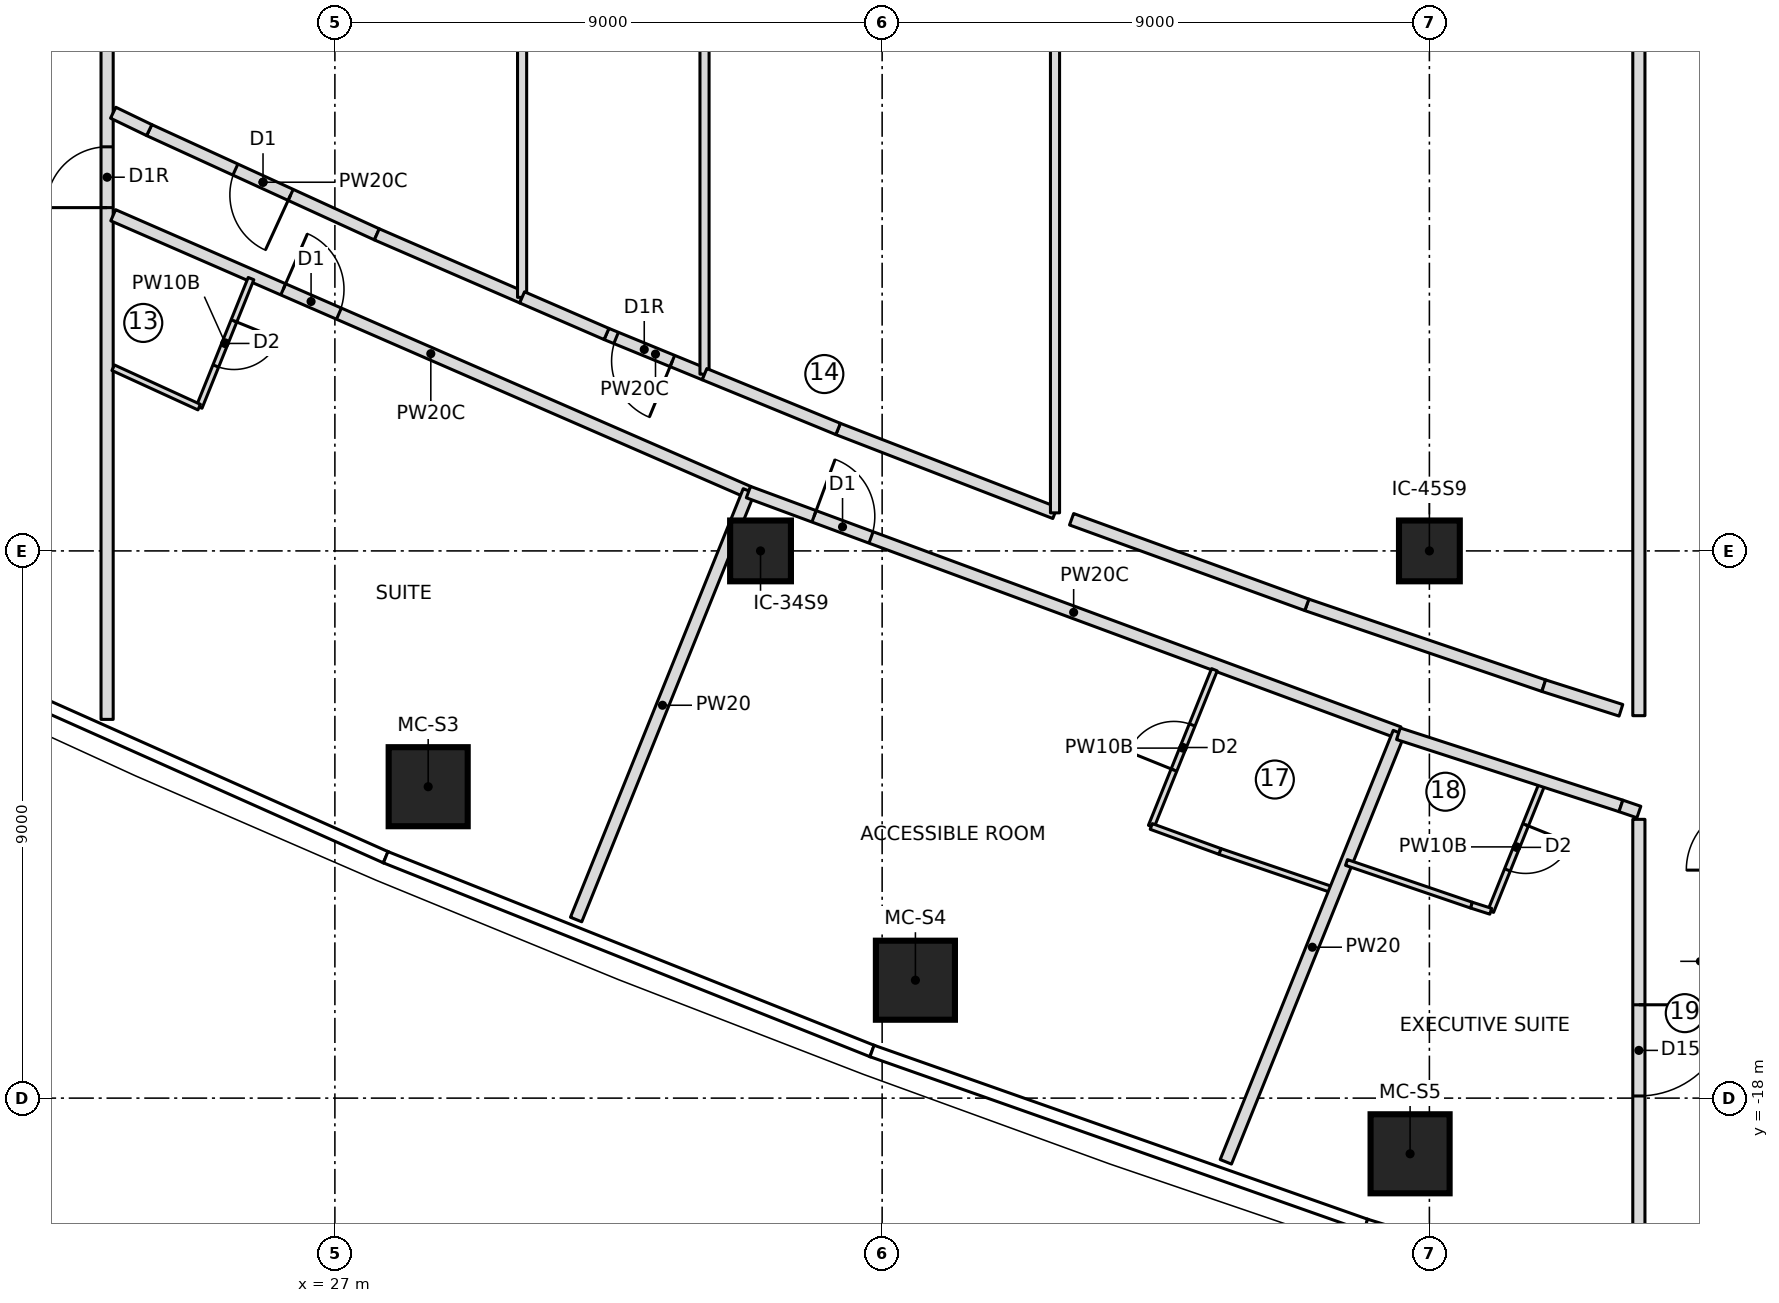
"""IFC4 building model, lengths in metres.
Left out: names, types, materials, properties, quantities, classifications, styles, units other than length and angle.
Written with IfcOpenShell. Run it as: python <this file> out.ifc"""

import sys

from ifc_helpers import new_model, si_unit, direction, frame, frame_2d, origin, origin_2d, place, context, subcontext, project, spatial, rectangle, extrude, element, fill, save


model = new_model("IFC4")
c1 = context("Model", 3, precision=1e-05, world=origin(), true_north=direction((0.0, 1.0)))
c2 = subcontext(c1, "Body", "Model", "MODEL_VIEW")
j1 = project(units=[si_unit("LENGTHUNIT", "METRE"), si_unit("PLANEANGLEUNIT", "RADIAN")], contexts=[c1])
p1 = place(None, origin())
s1 = spatial("IfcSite", under=j1, at=p1, CompositionType="ELEMENT")
p2 = place(p1, origin())
s2 = spatial("IfcBuilding", under=s1, at=p2, CompositionType="ELEMENT")
p3 = place(p2, frame((0.0, 0.0, 182.6)))
s3 = spatial("IfcBuildingStorey", under=s2, at=p3, CompositionType="ELEMENT", Elevation=182.6)
for number, where, z_axis, x_axis in (
    (1, (28.534, -12.878, 0.0), (0.0, 0.0, 1.0), (1.0, 0.0, 0.0)),
    (2, (36.547, -16.061, 0.0), (0.0, 0.0, 1.0), (1.0, 0.0, 0.0)),
    (3, (44.683, -18.916, 0.0), (0.0, 0.0, 1.0), (1.0, 0.0, 0.0)),
):
    element("IfcColumn", number, at=place(p3, frame(where, z_axis=z_axis, x_axis=x_axis)), inside=s3, PredefinedType="COLUMN", context=c2, shape_type="SweptSolid", body=[
        extrude(rectangle(XDim=1.3, YDim=1.3, at=origin_2d()), origin(), (0.0, 0.0, 1.0), 3.55),
    ])
for number, where, z_axis, x_axis in (
    (4, (34.0, -9.0, 0.0), (0.0, 0.0, 1.0), (1.0, 0.0, 0.0)),
    (5, (45.0, -9.0, 0.0), (0.0, 0.0, 1.0), (1.0, 0.0, 0.0)),
):
    element("IfcColumn", number, at=place(p3, frame(where, z_axis=z_axis, x_axis=x_axis)), inside=s3, PredefinedType="COLUMN", context=c2, shape_type="SweptSolid", body=[
        extrude(rectangle(XDim=1.0, YDim=1.0, at=origin_2d()), origin(), (0.0, 0.0, 1.0), 3.55),
    ])
p4 = place(p3, frame((23.254, -11.771, 0.0), z_axis=(0.0, 0.0, 1.0), x_axis=(0.0, 1.0, 0.0)))
e6 = element("IfcWall", 6, at=p4, inside=s3, PredefinedType="PARTITIONING", context=c2, shape_type="SweptSolid", body=[
    extrude(rectangle(XDim=23.542, YDim=0.2, at=frame_2d((11.771, 0.0))), origin(), (0.0, 0.0, 1.0), 3.25),
])
p5 = place(p4, frame((14.125, 0.0, 0.0)))
e7 = element("IfcOpeningElement", 7, at=p5, cuts=e6, PredefinedType="OPENING", context=c2, shape_type="SweptSolid", body=[
    extrude(rectangle(XDim=1.0, YDim=2.1, at=frame_2d((0.5, 1.05))), frame((0.0, 0.11, 0.0), z_axis=(0.0, -1.0, 0.0), x_axis=(1.0, 0.0, 0.0)), (0.0, 0.0, 1.0), 0.22),
])
p6 = place(p4, frame((8.417, 0.0, 0.0)))
e8 = element("IfcOpeningElement", 8, at=p6, cuts=e6, PredefinedType="OPENING", context=c2, shape_type="SweptSolid", body=[
    extrude(rectangle(XDim=1.0, YDim=2.1, at=frame_2d((0.5, 1.05))), frame((0.0, 0.11, 0.0), z_axis=(0.0, -1.0, 0.0), x_axis=(1.0, 0.0, 0.0)), (0.0, 0.0, 1.0), 0.22),
])
p7 = place(p3, frame((23.354, -3.479, 0.0), z_axis=(0.0, 0.0, 1.0), x_axis=(0.916726746983, -0.399514794926, 0.0)))
e9 = element("IfcWall", 9, at=p7, inside=s3, PredefinedType="PARTITIONING", context=c2, shape_type="SweptSolid", body=[
    extrude(rectangle(XDim=11.396, YDim=0.2, at=frame_2d((5.698, 0.0))), origin(), (0.0, 0.0, 1.0), 3.25),
])
p8 = place(p7, frame((3.05, 0.0, 0.0)))
e10 = element("IfcOpeningElement", 10, at=p8, cuts=e9, PredefinedType="OPENING", context=c2, shape_type="SweptSolid", body=[
    extrude(rectangle(XDim=1.0, YDim=2.1, at=frame_2d((0.5, 1.05))), frame((0.0, 0.11, 0.0), z_axis=(0.0, -1.0, 0.0), x_axis=(1.0, 0.0, 0.0)), (0.0, 0.0, 1.0), 0.22),
])
p9 = place(p3, frame((25.621, -4.521, 0.0), z_axis=(0.0, 0.0, 1.0), x_axis=(-0.373956446544, -0.927446265877, 0.0)))
e11 = element("IfcWall", 11, at=p9, inside=s3, PredefinedType="PARTITIONING", context=c2, shape_type="SweptSolid", body=[
    extrude(rectangle(XDim=2.279, YDim=0.1, at=frame_2d((1.14, 0.0))), origin(), (0.0, 0.0, 1.0), 3.25),
])
p10 = place(p9, frame((0.75, 0.0, 0.0)))
e12 = element("IfcOpeningElement", 12, at=p10, cuts=e11, PredefinedType="OPENING", context=c2, shape_type="SweptSolid", body=[
    extrude(rectangle(XDim=0.8, YDim=2.1, at=frame_2d((0.4, 1.05))), frame((0.0, 0.06, 0.0), z_axis=(0.0, -1.0, 0.0), x_axis=(1.0, 0.0, 0.0)), (0.0, 0.0, 1.0), 0.12),
])
p11 = place(p3, frame((24.769, -6.635, 0.0), z_axis=(0.0, 0.0, 1.0), x_axis=(-0.909158902999, 0.416449383597, 0.0)))
e13 = element("IfcWall", 13, at=p11, inside=s3, PredefinedType="PARTITIONING", context=c2, shape_type="SweptSolid", body=[
    extrude(rectangle(XDim=1.556, YDim=0.1, at=frame_2d((0.778, 0.0))), origin(), (0.0, 0.0, 1.0), 3.25),
])
p12 = place(p3, frame((30.967, -15.063, 0.0), z_axis=(0.0, 0.0, 1.0), x_axis=(0.373887223455, 0.927474174378, 0.0)))
e14 = element("IfcWall", 14, at=p12, inside=s3, PredefinedType="PARTITIONING", context=c2, shape_type="SweptSolid", body=[
    extrude(rectangle(XDim=7.6, YDim=0.2, at=frame_2d((3.8, 0.0))), origin(), (0.0, 0.0, 1.0), 3.25),
])
p13 = place(p3, frame((33.801, -8.032, 0.0), z_axis=(0.0, 0.0, 1.0), x_axis=(0.937916242759, -0.346861819127, 0.0)))
e15 = element("IfcWall", 15, at=p13, inside=s3, PredefinedType="PARTITIONING", context=c2, shape_type="SweptSolid", body=[
    extrude(rectangle(XDim=11.405, YDim=0.2, at=frame_2d((5.702, 0.0))), origin(), (0.0, 0.0, 1.0), 3.25),
])
p14 = place(p13, frame((1.15, 0.0, 0.0)))
e16 = element("IfcOpeningElement", 16, at=p14, cuts=e15, PredefinedType="OPENING", context=c2, shape_type="SweptSolid", body=[
    extrude(rectangle(XDim=1.0, YDim=2.1, at=frame_2d((0.5, 1.05))), frame((0.0, 0.11, 0.0), z_axis=(0.0, -1.0, 0.0), x_axis=(1.0, 0.0, 0.0)), (0.0, 0.0, 1.0), 0.22),
])
p15 = place(p3, frame((40.426, -13.532, 0.0), z_axis=(0.0, 0.0, 1.0), x_axis=(0.373889095325, 0.927473419779, 0.0)))
e17 = element("IfcWall", 17, at=p15, inside=s3, PredefinedType="PARTITIONING", context=c2, shape_type="SweptSolid", body=[
    extrude(rectangle(XDim=2.778, YDim=0.1, at=frame_2d((1.389, 0.0))), origin(), (0.0, 0.0, 1.0), 3.25),
])
p16 = place(p15, frame((1.0, 0.0, 0.0)))
e18 = element("IfcOpeningElement", 18, at=p16, cuts=e17, PredefinedType="OPENING", context=c2, shape_type="SweptSolid", body=[
    extrude(rectangle(XDim=0.8, YDim=2.1, at=frame_2d((0.4, 1.05))), frame((0.0, 0.06, 0.0), z_axis=(0.0, -1.0, 0.0), x_axis=(1.0, 0.0, 0.0)), (0.0, 0.0, 1.0), 0.12),
])
p17 = place(p3, frame((43.449, -14.589, 0.0), z_axis=(0.0, 0.0, 1.0), x_axis=(-0.94641533286, 0.322952036265, 0.0)))
e19 = element("IfcWall", 19, at=p17, inside=s3, PredefinedType="PARTITIONING", context=c2, shape_type="SweptSolid", body=[
    extrude(rectangle(XDim=2.002, YDim=0.1, at=frame_2d((1.001, 0.0))), origin(), (0.0, 0.0, 1.0), 3.25),
])
p18 = place(p3, frame((41.555, -13.943, 0.0), z_axis=(0.0, 0.0, 1.0), x_axis=(-0.939781557461, 0.341775692897, 0.0)))
e20 = element("IfcWall", 20, at=p18, inside=s3, PredefinedType="PARTITIONING", context=c2, shape_type="SweptSolid", body=[
    extrude(rectangle(XDim=1.201, YDim=0.1, at=frame_2d((0.601, 0.0))), origin(), (0.0, 0.0, 1.0), 3.25),
])
p19 = place(p3, frame((41.652, -19.048, 0.0), z_axis=(0.0, 0.0, 1.0), x_axis=(0.373877998371, 0.927477893178, 0.0)))
e21 = element("IfcWall", 21, at=p19, inside=s3, PredefinedType="PARTITIONING", context=c2, shape_type="SweptSolid", body=[
    extrude(rectangle(XDim=7.611, YDim=0.2, at=frame_2d((3.806, 0.0))), origin(), (0.0, 0.0, 1.0), 3.25),
])
p20 = place(p3, frame((46.863, -12.809, 0.0), z_axis=(0.0, 0.0, 1.0), x_axis=(-0.373877855241, -0.927477950876, 0.0)))
e22 = element("IfcWall", 22, at=p20, inside=s3, PredefinedType="PARTITIONING", context=c2, shape_type="SweptSolid", body=[
    extrude(rectangle(XDim=2.283, YDim=0.1, at=frame_2d((1.142, 0.0))), origin(), (0.0, 0.0, 1.0), 3.25),
])
p21 = place(p20, frame((0.75, 0.0, 0.0)))
e23 = element("IfcOpeningElement", 23, at=p21, cuts=e22, PredefinedType="OPENING", context=c2, shape_type="SweptSolid", body=[
    extrude(rectangle(XDim=0.8, YDim=2.1, at=frame_2d((0.4, 1.05))), frame((0.0, 0.06, 0.0), z_axis=(0.0, -1.0, 0.0), x_axis=(1.0, 0.0, 0.0)), (0.0, 0.0, 1.0), 0.12),
])
p22 = place(p3, frame((46.009, -14.927, 0.0), z_axis=(0.0, 0.0, 1.0), x_axis=(-0.952618746207, 0.304166935045, 0.0)))
e24 = element("IfcWall", 24, at=p22, inside=s3, PredefinedType="PARTITIONING", context=c2, shape_type="SweptSolid", body=[
    extrude(rectangle(XDim=0.335, YDim=0.1, at=frame_2d((0.167, 0.0))), origin(), (0.0, 0.0, 1.0), 3.25),
])
p23 = place(p3, frame((45.69, -14.825, 0.0), z_axis=(0.0, 0.0, 1.0), x_axis=(-0.946442988685, 0.322870979136, 0.0)))
e25 = element("IfcWall", 25, at=p23, inside=s3, PredefinedType="PARTITIONING", context=c2, shape_type="SweptSolid", body=[
    extrude(rectangle(XDim=2.169, YDim=0.1, at=frame_2d((1.085, 0.0))), origin(), (0.0, 0.0, 1.0), 3.25),
])
p24 = place(p3, frame((27.69, -3.793, 0.0), z_axis=(0.0, 0.0, 1.0), x_axis=(-0.909180834404, 0.416401501382, 0.0)))
e26 = element("IfcWall", 26, at=p24, inside=s3, PredefinedType="PARTITIONING", context=c2, shape_type="SweptSolid", body=[
    extrude(rectangle(XDim=4.117, YDim=0.2, at=frame_2d((2.059, 0.0))), origin(), (0.0, 0.0, 1.0), 3.25),
])
p25 = place(p24, frame((1.559, 0.0, 0.0)))
e27 = element("IfcOpeningElement", 27, at=p25, cuts=e26, PredefinedType="OPENING", context=c2, shape_type="SweptSolid", body=[
    extrude(rectangle(XDim=1.0, YDim=2.1, at=frame_2d((0.5, 1.05))), frame((0.0, 0.11, 0.0), z_axis=(0.0, -1.0, 0.0), x_axis=(1.0, 0.0, 0.0)), (0.0, 0.0, 1.0), 0.22),
])
p26 = place(p3, frame((23.947, -2.079, 0.0), z_axis=(0.0, 0.0, 1.0), x_axis=(-0.900646803965, 0.434551877809, 0.0)))
e28 = element("IfcWall", 28, at=p26, inside=s3, PredefinedType="PARTITIONING", context=c2, shape_type="SweptSolid", body=[
    extrude(rectangle(XDim=0.658, YDim=0.2, at=frame_2d((0.329, 0.0))), origin(), (0.0, 0.0, 1.0), 3.25),
])
p27 = place(p3, frame((30.079, -4.83, 0.0), z_axis=(0.0, 0.0, 1.0), x_axis=(-0.917370846112, 0.398033579869, 0.0)))
e29 = element("IfcWall", 29, at=p27, inside=s3, PredefinedType="PARTITIONING", context=c2, shape_type="SweptSolid", body=[
    extrude(rectangle(XDim=2.604, YDim=0.2, at=frame_2d((1.302, 0.0))), origin(), (0.0, 0.0, 1.0), 3.25),
])
p28 = place(p3, frame((30.079, -4.83, 0.0), z_axis=(0.0, 0.0, 1.0), x_axis=(0.0, 1.0, 0.0)))
e30 = element("IfcWall", 30, at=p28, inside=s3, PredefinedType="PARTITIONING", context=c2, shape_type="SweptSolid", body=[
    extrude(rectangle(XDim=9.66, YDim=0.15, at=frame_2d((4.83, 0.0))), origin(), (0.0, 0.0, 1.0), 3.25),
])
p29 = place(p3, frame((33.079, -6.093, 0.0), z_axis=(0.0, 0.0, 1.0), x_axis=(-0.925234201035, 0.379396459177, 0.0)))
e31 = element("IfcWall", 31, at=p29, inside=s3, PredefinedType="PARTITIONING", context=c2, shape_type="SweptSolid", body=[
    extrude(rectangle(XDim=1.743, YDim=0.2, at=frame_2d((0.871, 0.0))), origin(), (0.0, 0.0, 1.0), 3.25),
])
p30 = place(p29, frame((0.571, 0.0, 0.0)))
e32 = element("IfcOpeningElement", 32, at=p30, cuts=e31, PredefinedType="OPENING", context=c2, shape_type="SweptSolid", body=[
    extrude(rectangle(XDim=1.0, YDim=2.1, at=frame_2d((0.5, 1.05))), frame((0.0, 0.11, 0.0), z_axis=(0.0, -1.0, 0.0), x_axis=(1.0, 0.0, 0.0)), (0.0, 0.0, 1.0), 0.22),
])
p31 = place(p3, frame((31.467, -5.432, 0.0), z_axis=(0.0, 0.0, 1.0), x_axis=(-0.917382817853, 0.398005986774, 0.0)))
e33 = element("IfcWall", 33, at=p31, inside=s3, PredefinedType="PARTITIONING", context=c2, shape_type="SweptSolid", body=[
    extrude(rectangle(XDim=1.513, YDim=0.2, at=frame_2d((0.756, 0.0))), origin(), (0.0, 0.0, 1.0), 3.25),
])
p32 = place(p3, frame((33.079, -6.093, 0.0), z_axis=(0.0, 0.0, 1.0), x_axis=(0.0, 1.0, 0.0)))
e34 = element("IfcWall", 34, at=p32, inside=s3, PredefinedType="PARTITIONING", context=c2, shape_type="SweptSolid", body=[
    extrude(rectangle(XDim=12.187, YDim=0.15, at=frame_2d((6.093, 0.0))), origin(), (0.0, 0.0, 1.0), 3.25),
])
p33 = place(p3, frame((38.843, -8.374, 0.0), z_axis=(0.0, 0.0, 1.0), x_axis=(-0.932681040007, 0.360702200731, 0.0)))
e35 = element("IfcWall", 35, at=p33, inside=s3, PredefinedType="PARTITIONING", context=c2, shape_type="SweptSolid", body=[
    extrude(rectangle(XDim=3.825, YDim=0.2, at=frame_2d((1.913, 0.0))), origin(), (0.0, 0.0, 1.0), 3.25),
])
p34 = place(p3, frame((35.276, -6.994, 0.0), z_axis=(0.0, 0.0, 1.0), x_axis=(-0.925186207522, 0.37951347988, 0.0)))
e36 = element("IfcWall", 36, at=p34, inside=s3, PredefinedType="PARTITIONING", context=c2, shape_type="SweptSolid", body=[
    extrude(rectangle(XDim=2.375, YDim=0.2, at=frame_2d((1.187, 0.0))), origin(), (0.0, 0.0, 1.0), 3.25),
])
p35 = place(p3, frame((38.843, -8.374, 0.0), z_axis=(0.0, 0.0, 1.0), x_axis=(0.0, 1.0, 0.0)))
e37 = element("IfcWall", 37, at=p35, inside=s3, PredefinedType="PARTITIONING", context=c2, shape_type="SweptSolid", body=[
    extrude(rectangle(XDim=16.748, YDim=0.15, at=frame_2d((8.374, 0.0))), origin(), (0.0, 0.0, 1.0), 3.25),
])
for number, where, z_axis, x_axis in (
    (38, (46.881, -11.217, 0.0), (0.0, 0.0, 1.0), (-0.946, 0.323, 0.0)),
    (39, (42.984, -9.887, 0.0), (0.0, 0.0, 1.0), (-0.94, 0.342, 0.0)),
):
    element("IfcWall", number, at=place(p3, frame(where, z_axis=z_axis, x_axis=x_axis)), inside=s3, PredefinedType="PARTITIONING", context=c2, shape_type="SweptSolid", body=[
        extrude(rectangle(XDim=4.117, YDim=0.2, at=frame_2d((2.059, 0.0))), origin(), (0.0, 0.0, 1.0), 3.25),
    ])
p36 = place(p3, frame((44.49, -12.007, 0.0), z_axis=(0.0, 0.0, 1.0), x_axis=(0.951228355446, -0.308487626648, 0.0)))
e40 = element("IfcWall", 40, at=p36, inside=s3, PredefinedType="PARTITIONING", context=c2, shape_type="SweptSolid", body=[
    extrude(rectangle(XDim=3.847, YDim=0.2, at=frame_2d((1.924, 0.0))), origin(), (0.0, 0.0, 1.0), 3.25),
])
p37 = place(p3, frame((48.15, -11.621, 0.0), z_axis=(0.0, 0.0, 1.0), x_axis=(-0.952761948983, 0.303718074157, 0.0)))
e41 = element("IfcWall", 41, at=p37, inside=s3, PredefinedType="PARTITIONING", context=c2, shape_type="SweptSolid", body=[
    extrude(rectangle(XDim=1.332, YDim=0.2, at=frame_2d((0.666, 0.0))), origin(), (0.0, 0.0, 1.0), 3.25),
])
p38 = place(p3, frame((48.445, 11.71, 0.0), z_axis=(0.0, 0.0, 1.0), x_axis=(0.0, -1.0, 0.0)))
e42 = element("IfcWall", 42, at=p38, inside=s3, PredefinedType="PARTITIONING", context=c2, shape_type="SweptSolid", body=[
    extrude(rectangle(XDim=23.42, YDim=0.2, at=frame_2d((11.71, 0.0))), origin(), (0.0, 0.0, 1.0), 3.25),
])
p39 = place(p3, frame((48.15, -13.194, 0.0), z_axis=(0.0, 0.0, 1.0), x_axis=(0.946069343286, -0.323964191994, 0.0)))
e43 = element("IfcWall", 43, at=p39, inside=s3, PredefinedType="PARTITIONING", context=c2, shape_type="SweptSolid", body=[
    extrude(rectangle(XDim=0.312, YDim=0.2, at=frame_2d((0.156, 0.0))), origin(), (0.0, 0.0, 1.0), 3.25),
])
p40 = place(p3, frame((48.445, -13.415, 0.0), z_axis=(0.0, 0.0, 1.0), x_axis=(0.0, -1.0, 0.0)))
e44 = element("IfcWall", 44, at=p40, inside=s3, PredefinedType="PARTITIONING", context=c2, shape_type="SweptSolid", body=[
    extrude(rectangle(XDim=6.936, YDim=0.2, at=frame_2d((3.468, 0.0))), origin(), (0.0, 0.0, 1.0), 3.25),
])
p41 = place(p40, frame((3.05, 0.0, 0.0)))
e45 = element("IfcOpeningElement", 45, at=p41, cuts=e44, PredefinedType="OPENING", context=c2, shape_type="SweptSolid", body=[
    extrude(rectangle(XDim=1.5, YDim=2.1, at=frame_2d((0.75, 1.05))), frame((0.0, 0.11, 0.0), z_axis=(0.0, -1.0, 0.0), x_axis=(1.0, 0.0, 0.0)), (0.0, 0.0, 1.0), 0.22),
])
p42 = place(p6, origin())
e46 = element("IfcDoor", 46, at=p42, inside=s3, OperationType="SINGLE_SWING_RIGHT", PredefinedType="DOOR", context=c2, shape_type="SweptSolid", body=[
    extrude(rectangle(XDim=1.0, YDim=2.1, at=frame_2d((0.5, 1.05))), frame((0.0, 0.025, 0.0), z_axis=(0.0, -1.0, 0.0), x_axis=(1.0, 0.0, 0.0)), (0.0, 0.0, 1.0), 0.05),
])
fill(e8, e46)
p43 = place(p10, origin())
e47 = element("IfcDoor", 47, at=p43, inside=s3, OperationType="SINGLE_SWING_LEFT", PredefinedType="DOOR", context=c2, shape_type="SweptSolid", body=[
    extrude(rectangle(XDim=0.8, YDim=2.1, at=frame_2d((0.4, 1.05))), frame((0.0, 0.025, 0.0), z_axis=(0.0, -1.0, 0.0), x_axis=(1.0, 0.0, 0.0)), (0.0, 0.0, 1.0), 0.05),
])
fill(e12, e47)
p44 = place(p8, origin())
e48 = element("IfcDoor", 48, at=p44, inside=s3, OperationType="SINGLE_SWING_LEFT", PredefinedType="DOOR", context=c2, shape_type="SweptSolid", body=[
    extrude(rectangle(XDim=1.0, YDim=2.1, at=frame_2d((0.5, 1.05))), frame((0.0, 0.025, 0.0), z_axis=(0.0, -1.0, 0.0), x_axis=(1.0, 0.0, 0.0)), (0.0, 0.0, 1.0), 0.05),
])
fill(e10, e48)
p45 = place(p16, origin())
e49 = element("IfcDoor", 49, at=p45, inside=s3, OperationType="SINGLE_SWING_LEFT", PredefinedType="DOOR", context=c2, shape_type="SweptSolid", body=[
    extrude(rectangle(XDim=0.8, YDim=2.1, at=frame_2d((0.4, 1.05))), frame((0.0, 0.025, 0.0), z_axis=(0.0, -1.0, 0.0), x_axis=(1.0, 0.0, 0.0)), (0.0, 0.0, 1.0), 0.05),
])
fill(e18, e49)
p46 = place(p14, origin())
e50 = element("IfcDoor", 50, at=p46, inside=s3, OperationType="SINGLE_SWING_LEFT", PredefinedType="DOOR", context=c2, shape_type="SweptSolid", body=[
    extrude(rectangle(XDim=1.0, YDim=2.1, at=frame_2d((0.5, 1.05))), frame((0.0, 0.025, 0.0), z_axis=(0.0, -1.0, 0.0), x_axis=(1.0, 0.0, 0.0)), (0.0, 0.0, 1.0), 0.05),
])
fill(e16, e50)
p47 = place(p21, origin())
e51 = element("IfcDoor", 51, at=p47, inside=s3, OperationType="SINGLE_SWING_LEFT", PredefinedType="DOOR", context=c2, shape_type="SweptSolid", body=[
    extrude(rectangle(XDim=0.8, YDim=2.1, at=frame_2d((0.4, 1.05))), frame((0.0, 0.025, 0.0), z_axis=(0.0, -1.0, 0.0), x_axis=(1.0, 0.0, 0.0)), (0.0, 0.0, 1.0), 0.05),
])
fill(e23, e51)
p48 = place(p25, origin())
e52 = element("IfcDoor", 52, at=p48, inside=s3, OperationType="SINGLE_SWING_LEFT", PredefinedType="DOOR", context=c2, shape_type="SweptSolid", body=[
    extrude(rectangle(XDim=1.0, YDim=2.1, at=frame_2d((0.5, 1.05))), frame((0.0, 0.025, 0.0), z_axis=(0.0, -1.0, 0.0), x_axis=(1.0, 0.0, 0.0)), (0.0, 0.0, 1.0), 0.05),
])
fill(e27, e52)
p49 = place(p30, origin())
e53 = element("IfcDoor", 53, at=p49, inside=s3, OperationType="SINGLE_SWING_RIGHT", PredefinedType="DOOR", context=c2, shape_type="SweptSolid", body=[
    extrude(rectangle(XDim=1.0, YDim=2.1, at=frame_2d((0.5, 1.05))), frame((0.0, 0.025, 0.0), z_axis=(0.0, -1.0, 0.0), x_axis=(1.0, 0.0, 0.0)), (0.0, 0.0, 1.0), 0.05),
])
fill(e32, e53)
p50 = place(p41, origin())
e54 = element("IfcDoor", 54, at=p50, inside=s3, OperationType="DOUBLE_DOOR_SINGLE_SWING", PredefinedType="DOOR", context=c2, shape_type="SweptSolid", body=[
    extrude(rectangle(XDim=1.5, YDim=2.1, at=frame_2d((0.75, 1.05))), frame((0.0, 0.025, 0.0), z_axis=(0.0, -1.0, 0.0), x_axis=(1.0, 0.0, 0.0)), (0.0, 0.0, 1.0), 0.05),
])
fill(e45, e54)
save(model, sys.argv[1])
